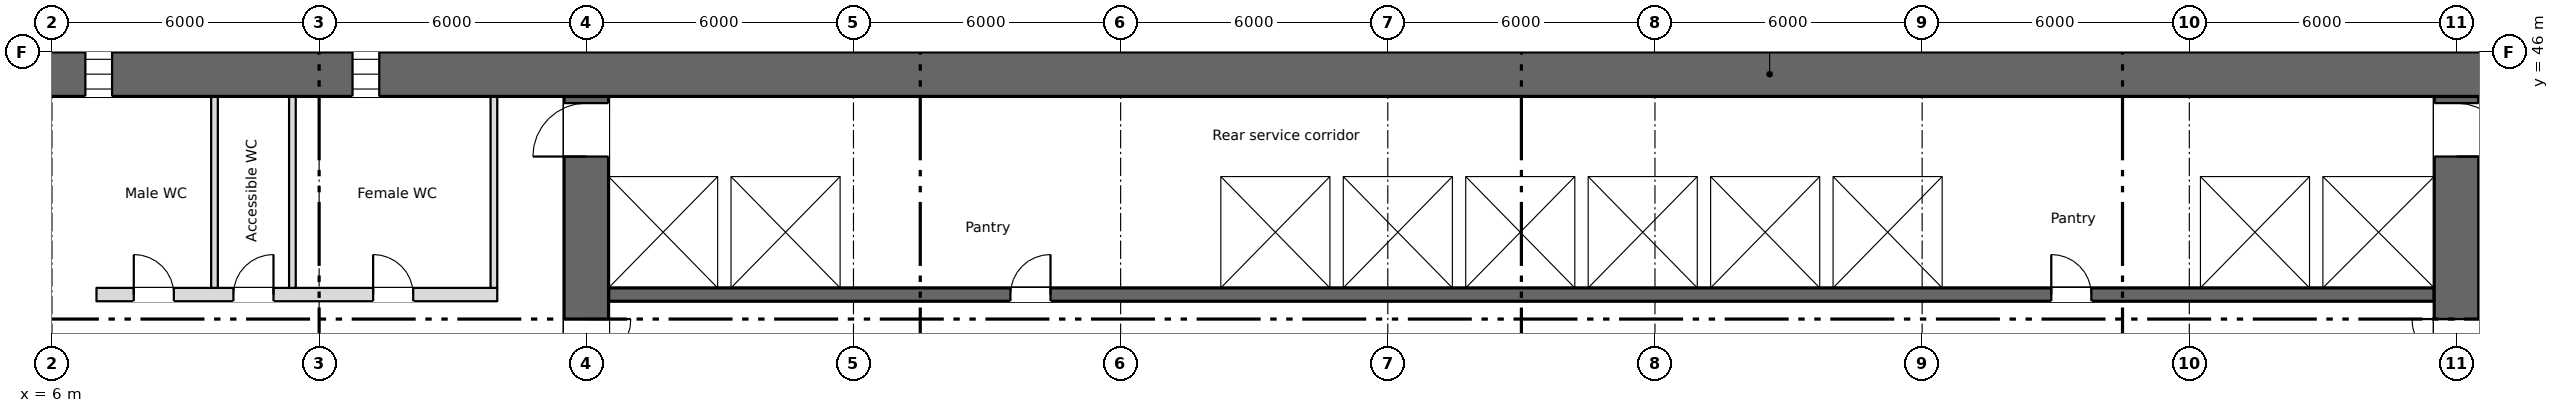
"""IFC4 building model, lengths in metres.
Left out: names, types, materials, properties, quantities, classifications, styles, units other than length and angle.
Written with IfcOpenShell. Run it as: python <this file> out.ifc"""

import sys

from ifc_helpers import new_model, si_unit, direction, frame, frame_2d, origin, place, context, subcontext, project, spatial, rectangle, extrude, element, fill, save


model = new_model("IFC4")
c1 = context("Model", 3, precision=1e-05, world=origin(), true_north=direction((0.0, 1.0)))
c2 = subcontext(c1, "Body", "Model", "MODEL_VIEW")
j1 = project(units=[si_unit("LENGTHUNIT", "METRE"), si_unit("PLANEANGLEUNIT", "RADIAN")], contexts=[c1])
p1 = place(None, origin())
s1 = spatial("IfcSite", under=j1, at=p1, CompositionType="ELEMENT")
p2 = place(p1, origin())
s2 = spatial("IfcBuilding", under=s1, at=p2, CompositionType="ELEMENT")
p3 = place(p2, frame((0.0, 0.0, 41.25)))
s3 = spatial("IfcBuildingStorey", under=s2, at=p3, CompositionType="ELEMENT", Elevation=41.25)
p4 = place(p3, frame((5.55, 45.5, 0.0), z_axis=(0.0, 0.0, 1.0), x_axis=(1.0, 0.0, 0.0)))
e1 = element("IfcWall", 1, at=p4, inside=s3, PredefinedType="SHEAR", context=c2, shape_type="SweptSolid", body=[
    extrude(rectangle(XDim=66.9, YDim=1.0, at=frame_2d((33.45, 0.0))), origin(), (0.0, 0.0, 1.0), 3.35),
])
p5 = place(p4, frame((1.2, 0.0, 0.6)))
e2 = element("IfcOpeningElement", 2, at=p5, cuts=e1, PredefinedType="OPENING", context=c2, shape_type="SweptSolid", body=[
    extrude(rectangle(XDim=0.6, YDim=2.4, at=frame_2d((0.3, 1.2))), frame((0.0, 0.51, 0.0), z_axis=(0.0, -1.0, 0.0), x_axis=(1.0, 0.0, 0.0)), (0.0, 0.0, 1.0), 1.02),
])
p6 = place(p4, frame((7.2, 0.0, 0.6)))
e3 = element("IfcOpeningElement", 3, at=p6, cuts=e1, PredefinedType="OPENING", context=c2, shape_type="SweptSolid", body=[
    extrude(rectangle(XDim=0.6, YDim=2.4, at=frame_2d((0.3, 1.2))), frame((0.0, 0.51, 0.0), z_axis=(0.0, -1.0, 0.0), x_axis=(1.0, 0.0, 0.0)), (0.0, 0.0, 1.0), 1.02),
])
p7 = place(p4, frame((55.2, 0.0, 0.6)))
e4 = element("IfcOpeningElement", 4, at=p7, cuts=e1, PredefinedType="OPENING", context=c2, shape_type="SweptSolid", body=[
    extrude(rectangle(XDim=0.6, YDim=2.4, at=frame_2d((0.3, 1.2))), frame((0.0, 0.51, 0.0), z_axis=(0.0, -1.0, 0.0), x_axis=(1.0, 0.0, 0.0)), (0.0, 0.0, 1.0), 1.02),
])
p8 = place(p4, frame((61.2, 0.0, 0.6)))
e5 = element("IfcOpeningElement", 5, at=p8, cuts=e1, PredefinedType="OPENING", context=c2, shape_type="SweptSolid", body=[
    extrude(rectangle(XDim=0.6, YDim=2.4, at=frame_2d((0.3, 1.2))), frame((0.0, 0.51, 0.0), z_axis=(0.0, -1.0, 0.0), x_axis=(1.0, 0.0, 0.0)), (0.0, 0.0, 1.0), 1.02),
])
p9 = place(p3, frame((6.85, 28.4, 0.0), z_axis=(0.0, 0.0, 1.0), x_axis=(0.0, 1.0, 0.0)))
e6 = element("IfcWall", 6, at=p9, inside=s3, PredefinedType="SHEAR", context=c2, shape_type="SweptSolid", body=[
    extrude(rectangle(XDim=16.6, YDim=0.3, at=frame_2d((8.3, 0.0))), origin(), (0.0, 0.0, 1.0), 3.35),
])
p10 = place(p3, frame((18.0, 28.4, 0.0), z_axis=(0.0, 0.0, 1.0), x_axis=(0.0, 1.0, 0.0)))
e7 = element("IfcWall", 7, at=p10, inside=s3, PredefinedType="SHEAR", context=c2, shape_type="SweptSolid", body=[
    extrude(rectangle(XDim=16.6, YDim=1.0, at=frame_2d((8.3, 0.0))), origin(), (0.0, 0.0, 1.0), 3.35),
])
p11 = place(p10, frame((9.6, 0.0, 0.0)))
e8 = element("IfcOpeningElement", 8, at=p11, cuts=e7, PredefinedType="OPENING", context=c2, shape_type="SweptSolid", body=[
    extrude(rectangle(XDim=2.0, YDim=2.1, at=frame_2d((1.0, 1.05))), frame((0.0, 0.51, 0.0), z_axis=(0.0, -1.0, 0.0), x_axis=(1.0, 0.0, 0.0)), (0.0, 0.0, 1.0), 1.02),
])
p12 = place(p10, frame((15.25, 0.0, 0.0)))
e9 = element("IfcOpeningElement", 9, at=p12, cuts=e7, PredefinedType="OPENING", context=c2, shape_type="SweptSolid", body=[
    extrude(rectangle(XDim=1.2, YDim=2.1, at=frame_2d((0.6, 1.05))), frame((0.0, 0.51, 0.0), z_axis=(0.0, -1.0, 0.0), x_axis=(1.0, 0.0, 0.0)), (0.0, 0.0, 1.0), 1.02),
])
p13 = place(p3, frame((60.0, 28.4, 0.0), z_axis=(0.0, 0.0, 1.0), x_axis=(0.0, 1.0, 0.0)))
e10 = element("IfcWall", 10, at=p13, inside=s3, PredefinedType="SHEAR", context=c2, shape_type="SweptSolid", body=[
    extrude(rectangle(XDim=16.6, YDim=1.0, at=frame_2d((8.3, 0.0))), origin(), (0.0, 0.0, 1.0), 3.35),
])
p14 = place(p13, frame((9.6, 0.0, 0.0)))
e11 = element("IfcOpeningElement", 11, at=p14, cuts=e10, PredefinedType="OPENING", context=c2, shape_type="SweptSolid", body=[
    extrude(rectangle(XDim=2.0, YDim=2.1, at=frame_2d((1.0, 1.05))), frame((0.0, 0.51, 0.0), z_axis=(0.0, -1.0, 0.0), x_axis=(1.0, 0.0, 0.0)), (0.0, 0.0, 1.0), 1.02),
])
p15 = place(p13, frame((15.25, 0.0, 0.0)))
e12 = element("IfcOpeningElement", 12, at=p15, cuts=e10, PredefinedType="OPENING", context=c2, shape_type="SweptSolid", body=[
    extrude(rectangle(XDim=1.2, YDim=2.1, at=frame_2d((0.6, 1.05))), frame((0.0, 0.51, 0.0), z_axis=(0.0, -1.0, 0.0), x_axis=(1.0, 0.0, 0.0)), (0.0, 0.0, 1.0), 1.02),
])
p16 = place(p3, frame((18.5, 40.55, 0.0), z_axis=(0.0, 0.0, 1.0), x_axis=(1.0, 0.0, 0.0)))
e13 = element("IfcWall", 13, at=p16, inside=s3, PredefinedType="SHEAR", context=c2, shape_type="SweptSolid", body=[
    extrude(rectangle(XDim=41.0, YDim=0.3, at=frame_2d((20.5, 0.0))), origin(), (0.0, 0.0, 1.0), 3.35),
])
p17 = place(p16, frame((9.025, 0.0, 0.0)))
e14 = element("IfcOpeningElement", 14, at=p17, cuts=e13, PredefinedType="OPENING", context=c2, shape_type="SweptSolid", body=[
    extrude(rectangle(XDim=0.9, YDim=2.1, at=frame_2d((0.45, 1.05))), frame((0.0, 0.16, 0.0), z_axis=(0.0, -1.0, 0.0), x_axis=(1.0, 0.0, 0.0)), (0.0, 0.0, 1.0), 0.32),
])
p18 = place(p16, frame((32.4, 0.0, 0.0)))
e15 = element("IfcOpeningElement", 15, at=p18, cuts=e13, PredefinedType="OPENING", context=c2, shape_type="SweptSolid", body=[
    extrude(rectangle(XDim=0.9, YDim=2.1, at=frame_2d((0.45, 1.05))), frame((0.0, 0.16, 0.0), z_axis=(0.0, -1.0, 0.0), x_axis=(1.0, 0.0, 0.0)), (0.0, 0.0, 1.0), 0.32),
])
p19 = place(p16, frame((14.425, 0.0, 0.0)))
e16 = element("IfcOpeningElement", 16, at=p19, cuts=e13, PredefinedType="OPENING", context=c2, shape_type="SweptSolid", body=[
    extrude(rectangle(XDim=1.1, YDim=2.1, at=frame_2d((0.55, 1.05))), frame((0.0, 0.16, 0.0), z_axis=(0.0, -1.0, 0.0), x_axis=(1.0, 0.0, 0.0)), (0.0, 0.0, 1.0), 0.32),
])
p20 = place(p16, frame((17.175, 0.0, 0.0)))
e17 = element("IfcOpeningElement", 17, at=p20, cuts=e13, PredefinedType="OPENING", context=c2, shape_type="SweptSolid", body=[
    extrude(rectangle(XDim=1.1, YDim=2.1, at=frame_2d((0.55, 1.05))), frame((0.0, 0.16, 0.0), z_axis=(0.0, -1.0, 0.0), x_axis=(1.0, 0.0, 0.0)), (0.0, 0.0, 1.0), 0.32),
])
p21 = place(p16, frame((19.925, 0.0, 0.0)))
e18 = element("IfcOpeningElement", 18, at=p21, cuts=e13, PredefinedType="OPENING", context=c2, shape_type="SweptSolid", body=[
    extrude(rectangle(XDim=1.1, YDim=2.1, at=frame_2d((0.55, 1.05))), frame((0.0, 0.16, 0.0), z_axis=(0.0, -1.0, 0.0), x_axis=(1.0, 0.0, 0.0)), (0.0, 0.0, 1.0), 0.32),
])
p22 = place(p16, frame((22.675, 0.0, 0.0)))
e19 = element("IfcOpeningElement", 19, at=p22, cuts=e13, PredefinedType="OPENING", context=c2, shape_type="SweptSolid", body=[
    extrude(rectangle(XDim=1.1, YDim=2.1, at=frame_2d((0.55, 1.05))), frame((0.0, 0.16, 0.0), z_axis=(0.0, -1.0, 0.0), x_axis=(1.0, 0.0, 0.0)), (0.0, 0.0, 1.0), 0.32),
])
p23 = place(p16, frame((36.375, 0.0, 0.0)))
e20 = element("IfcOpeningElement", 20, at=p23, cuts=e13, PredefinedType="OPENING", context=c2, shape_type="SweptSolid", body=[
    extrude(rectangle(XDim=1.2, YDim=2.1, at=frame_2d((0.6, 1.05))), frame((0.0, 0.16, 0.0), z_axis=(0.0, -1.0, 0.0), x_axis=(1.0, 0.0, 0.0)), (0.0, 0.0, 1.0), 0.32),
])
p24 = place(p16, frame((39.15, 0.0, 0.0)))
e21 = element("IfcOpeningElement", 21, at=p24, cuts=e13, PredefinedType="OPENING", context=c2, shape_type="SweptSolid", body=[
    extrude(rectangle(XDim=1.2, YDim=2.1, at=frame_2d((0.6, 1.05))), frame((0.0, 0.16, 0.0), z_axis=(0.0, -1.0, 0.0), x_axis=(1.0, 0.0, 0.0)), (0.0, 0.0, 1.0), 0.32),
])
p25 = place(p3, frame((18.5, 43.35, 0.0), z_axis=(0.0, 0.0, 1.0), x_axis=(1.0, 0.0, 0.0)))
e22 = element("IfcWall", 22, at=p25, inside=s3, PredefinedType="SHEAR", context=c2, shape_type="SweptSolid", body=[
    extrude(rectangle(XDim=41.0, YDim=0.3, at=frame_2d((20.5, 0.0))), origin(), (0.0, 0.0, 1.0), 3.35),
])
p26 = place(p3, frame((7.0, 40.55, 0.0), z_axis=(0.0, 0.0, 1.0), x_axis=(1.0, 0.0, 0.0)))
e23 = element("IfcWall", 23, at=p26, inside=s3, PredefinedType="PARTITIONING", context=c2, shape_type="SweptSolid", body=[
    extrude(rectangle(XDim=9.0, YDim=0.3, at=frame_2d((4.5, 0.0))), origin(), (0.0, 0.0, 1.0), 3.35),
])
p27 = place(p26, frame((0.837, 0.0, 0.0)))
e24 = element("IfcOpeningElement", 24, at=p27, cuts=e23, PredefinedType="OPENING", context=c2, shape_type="SweptSolid", body=[
    extrude(rectangle(XDim=0.9, YDim=2.1, at=frame_2d((0.45, 1.05))), frame((0.0, 0.16, 0.0), z_axis=(0.0, -1.0, 0.0), x_axis=(1.0, 0.0, 0.0)), (0.0, 0.0, 1.0), 0.32),
])
p28 = place(p26, frame((3.075, 0.0, 0.0)))
e25 = element("IfcOpeningElement", 25, at=p28, cuts=e23, PredefinedType="OPENING", context=c2, shape_type="SweptSolid", body=[
    extrude(rectangle(XDim=0.9, YDim=2.1, at=frame_2d((0.45, 1.05))), frame((0.0, 0.16, 0.0), z_axis=(0.0, -1.0, 0.0), x_axis=(1.0, 0.0, 0.0)), (0.0, 0.0, 1.0), 0.32),
])
p29 = place(p26, frame((6.212, 0.0, 0.0)))
e26 = element("IfcOpeningElement", 26, at=p29, cuts=e23, PredefinedType="OPENING", context=c2, shape_type="SweptSolid", body=[
    extrude(rectangle(XDim=0.9, YDim=2.1, at=frame_2d((0.45, 1.05))), frame((0.0, 0.16, 0.0), z_axis=(0.0, -1.0, 0.0), x_axis=(1.0, 0.0, 0.0)), (0.0, 0.0, 1.0), 0.32),
])
for number, where, z_axis, x_axis in (
    (27, (21.1, 40.7, 0.0), (0.0, 0.0, 1.0), (0.0, 1.0, 0.0)),
    (28, (23.85, 40.7, 0.0), (0.0, 0.0, 1.0), (0.0, 1.0, 0.0)),
    (29, (32.1, 40.7, 0.0), (0.0, 0.0, 1.0), (0.0, 1.0, 0.0)),
    (30, (34.85, 40.7, 0.0), (0.0, 0.0, 1.0), (0.0, 1.0, 0.0)),
    (31, (37.6, 40.7, 0.0), (0.0, 0.0, 1.0), (0.0, 1.0, 0.0)),
    (32, (40.35, 40.7, 0.0), (0.0, 0.0, 1.0), (0.0, 1.0, 0.0)),
    (33, (43.1, 40.7, 0.0), (0.0, 0.0, 1.0), (0.0, 1.0, 0.0)),
    (34, (45.85, 40.7, 0.0), (0.0, 0.0, 1.0), (0.0, 1.0, 0.0)),
    (35, (48.6, 40.7, 0.0), (0.0, 0.0, 1.0), (0.0, 1.0, 0.0)),
    (36, (54.1, 40.7, 0.0), (0.0, 0.0, 1.0), (0.0, 1.0, 0.0)),
    (37, (56.85, 40.7, 0.0), (0.0, 0.0, 1.0), (0.0, 1.0, 0.0)),
):
    element("IfcWall", number, at=place(p3, frame(where, z_axis=z_axis, x_axis=x_axis)), inside=s3, PredefinedType="SHEAR", context=c2, shape_type="SweptSolid", body=[
        extrude(rectangle(XDim=2.5, YDim=0.3, at=frame_2d((1.25, 0.0))), origin(), (0.0, 0.0, 1.0), 3.35),
    ])
for number, where, z_axis, x_axis in (
    (38, (15.925, 40.7, 0.0), (0.0, 0.0, 1.0), (0.0, 1.0, 0.0)),
    (39, (9.65, 40.7, 0.0), (0.0, 0.0, 1.0), (0.0, 1.0, 0.0)),
    (40, (11.4, 40.7, 0.0), (0.0, 0.0, 1.0), (0.0, 1.0, 0.0)),
):
    element("IfcWall", number, at=place(p3, frame(where, z_axis=z_axis, x_axis=x_axis)), inside=s3, PredefinedType="PARTITIONING", context=c2, shape_type="SweptSolid", body=[
        extrude(rectangle(XDim=4.3, YDim=0.15, at=frame_2d((2.15, 0.0))), origin(), (0.0, 0.0, 1.0), 3.35),
    ])
p30 = place(p5, origin())
e41 = element("IfcWindow", 41, at=p30, inside=s3, PartitioningType="SINGLE_PANEL", PredefinedType="WINDOW", context=c2, shape_type="SweptSolid", body=[
    extrude(rectangle(XDim=0.6, YDim=2.4, at=frame_2d((0.3, 1.2))), frame((0.0, 0.03, 0.0), z_axis=(0.0, -1.0, 0.0), x_axis=(1.0, 0.0, 0.0)), (0.0, 0.0, 1.0), 0.06),
])
fill(e2, e41)
p31 = place(p6, origin())
e42 = element("IfcWindow", 42, at=p31, inside=s3, PartitioningType="SINGLE_PANEL", PredefinedType="WINDOW", context=c2, shape_type="SweptSolid", body=[
    extrude(rectangle(XDim=0.6, YDim=2.4, at=frame_2d((0.3, 1.2))), frame((0.0, 0.03, 0.0), z_axis=(0.0, -1.0, 0.0), x_axis=(1.0, 0.0, 0.0)), (0.0, 0.0, 1.0), 0.06),
])
fill(e3, e42)
p32 = place(p27, origin())
e43 = element("IfcDoor", 43, at=p32, inside=s3, OperationType="SINGLE_SWING_LEFT", PredefinedType="DOOR", context=c2, shape_type="SweptSolid", body=[
    extrude(rectangle(XDim=0.9, YDim=2.1, at=frame_2d((0.45, 1.05))), frame((0.0, 0.025, 0.0), z_axis=(0.0, -1.0, 0.0), x_axis=(1.0, 0.0, 0.0)), (0.0, 0.0, 1.0), 0.05),
])
fill(e24, e43)
p33 = place(p28, origin())
e44 = element("IfcDoor", 44, at=p33, inside=s3, OperationType="SINGLE_SWING_RIGHT", PredefinedType="DOOR", context=c2, shape_type="SweptSolid", body=[
    extrude(rectangle(XDim=0.9, YDim=2.1, at=frame_2d((0.45, 1.05))), frame((0.0, 0.025, 0.0), z_axis=(0.0, -1.0, 0.0), x_axis=(1.0, 0.0, 0.0)), (0.0, 0.0, 1.0), 0.05),
])
fill(e25, e44)
p34 = place(p29, origin())
e45 = element("IfcDoor", 45, at=p34, inside=s3, OperationType="SINGLE_SWING_LEFT", PredefinedType="DOOR", context=c2, shape_type="SweptSolid", body=[
    extrude(rectangle(XDim=0.9, YDim=2.1, at=frame_2d((0.45, 1.05))), frame((0.0, 0.025, 0.0), z_axis=(0.0, -1.0, 0.0), x_axis=(1.0, 0.0, 0.0)), (0.0, 0.0, 1.0), 0.05),
])
fill(e26, e45)
p35 = place(p17, origin())
e46 = element("IfcDoor", 46, at=p35, inside=s3, OperationType="SINGLE_SWING_RIGHT", PredefinedType="DOOR", context=c2, shape_type="SweptSolid", body=[
    extrude(rectangle(XDim=0.9, YDim=2.1, at=frame_2d((0.45, 1.05))), frame((0.0, 0.025, 0.0), z_axis=(0.0, -1.0, 0.0), x_axis=(1.0, 0.0, 0.0)), (0.0, 0.0, 1.0), 0.05),
])
fill(e14, e46)
p36 = place(p18, origin())
e47 = element("IfcDoor", 47, at=p36, inside=s3, OperationType="SINGLE_SWING_LEFT", PredefinedType="DOOR", context=c2, shape_type="SweptSolid", body=[
    extrude(rectangle(XDim=0.9, YDim=2.1, at=frame_2d((0.45, 1.05))), frame((0.0, 0.025, 0.0), z_axis=(0.0, -1.0, 0.0), x_axis=(1.0, 0.0, 0.0)), (0.0, 0.0, 1.0), 0.05),
])
fill(e15, e47)
p37 = place(p19, origin())
e48 = element("IfcDoor", 48, at=p37, inside=s3, OperationType="SLIDING_TO_LEFT", PredefinedType="DOOR", context=c2, shape_type="SweptSolid", body=[
    extrude(rectangle(XDim=1.1, YDim=2.1, at=frame_2d((0.55, 1.05))), frame((0.0, 0.025, 0.0), z_axis=(0.0, -1.0, 0.0), x_axis=(1.0, 0.0, 0.0)), (0.0, 0.0, 1.0), 0.05),
])
fill(e16, e48)
p38 = place(p20, origin())
e49 = element("IfcDoor", 49, at=p38, inside=s3, OperationType="SLIDING_TO_LEFT", PredefinedType="DOOR", context=c2, shape_type="SweptSolid", body=[
    extrude(rectangle(XDim=1.1, YDim=2.1, at=frame_2d((0.55, 1.05))), frame((0.0, 0.025, 0.0), z_axis=(0.0, -1.0, 0.0), x_axis=(1.0, 0.0, 0.0)), (0.0, 0.0, 1.0), 0.05),
])
fill(e17, e49)
p39 = place(p21, origin())
e50 = element("IfcDoor", 50, at=p39, inside=s3, OperationType="SLIDING_TO_LEFT", PredefinedType="DOOR", context=c2, shape_type="SweptSolid", body=[
    extrude(rectangle(XDim=1.1, YDim=2.1, at=frame_2d((0.55, 1.05))), frame((0.0, 0.025, 0.0), z_axis=(0.0, -1.0, 0.0), x_axis=(1.0, 0.0, 0.0)), (0.0, 0.0, 1.0), 0.05),
])
fill(e18, e50)
p40 = place(p22, origin())
e51 = element("IfcDoor", 51, at=p40, inside=s3, OperationType="SLIDING_TO_LEFT", PredefinedType="DOOR", context=c2, shape_type="SweptSolid", body=[
    extrude(rectangle(XDim=1.1, YDim=2.1, at=frame_2d((0.55, 1.05))), frame((0.0, 0.025, 0.0), z_axis=(0.0, -1.0, 0.0), x_axis=(1.0, 0.0, 0.0)), (0.0, 0.0, 1.0), 0.05),
])
fill(e19, e51)
p41 = place(p23, origin())
e52 = element("IfcDoor", 52, at=p41, inside=s3, OperationType="SLIDING_TO_LEFT", PredefinedType="DOOR", context=c2, shape_type="SweptSolid", body=[
    extrude(rectangle(XDim=1.2, YDim=2.1, at=frame_2d((0.6, 1.05))), frame((0.0, 0.025, 0.0), z_axis=(0.0, -1.0, 0.0), x_axis=(1.0, 0.0, 0.0)), (0.0, 0.0, 1.0), 0.05),
])
fill(e20, e52)
p42 = place(p24, origin())
e53 = element("IfcDoor", 53, at=p42, inside=s3, OperationType="SLIDING_TO_LEFT", PredefinedType="DOOR", context=c2, shape_type="SweptSolid", body=[
    extrude(rectangle(XDim=1.2, YDim=2.1, at=frame_2d((0.6, 1.05))), frame((0.0, 0.025, 0.0), z_axis=(0.0, -1.0, 0.0), x_axis=(1.0, 0.0, 0.0)), (0.0, 0.0, 1.0), 0.05),
])
fill(e21, e53)
p43 = place(p11, origin())
e54 = element("IfcDoor", 54, at=p43, inside=s3, OperationType="DOUBLE_DOOR_SINGLE_SWING", PredefinedType="DOOR", context=c2, shape_type="SweptSolid", body=[
    extrude(rectangle(XDim=2.0, YDim=2.1, at=frame_2d((1.0, 1.05))), frame((0.0, 0.025, 0.0), z_axis=(0.0, -1.0, 0.0), x_axis=(1.0, 0.0, 0.0)), (0.0, 0.0, 1.0), 0.05),
])
fill(e8, e54)
p44 = place(p14, origin())
e55 = element("IfcDoor", 55, at=p44, inside=s3, OperationType="DOUBLE_DOOR_SINGLE_SWING", PredefinedType="DOOR", context=c2, shape_type="SweptSolid", body=[
    extrude(rectangle(XDim=2.0, YDim=2.1, at=frame_2d((1.0, 1.05))), frame((0.0, 0.025, 0.0), z_axis=(0.0, -1.0, 0.0), x_axis=(1.0, 0.0, 0.0)), (0.0, 0.0, 1.0), 0.05),
])
fill(e11, e55)
p45 = place(p12, origin())
e56 = element("IfcDoor", 56, at=p45, inside=s3, OperationType="SINGLE_SWING_LEFT", PredefinedType="DOOR", context=c2, shape_type="SweptSolid", body=[
    extrude(rectangle(XDim=1.2, YDim=2.1, at=frame_2d((0.6, 1.05))), frame((0.0, 0.025, 0.0), z_axis=(0.0, -1.0, 0.0), x_axis=(1.0, 0.0, 0.0)), (0.0, 0.0, 1.0), 0.05),
])
fill(e9, e56)
p46 = place(p15, origin())
e57 = element("IfcDoor", 57, at=p46, inside=s3, OperationType="SINGLE_SWING_LEFT", PredefinedType="DOOR", context=c2, shape_type="SweptSolid", body=[
    extrude(rectangle(XDim=1.2, YDim=2.1, at=frame_2d((0.6, 1.05))), frame((0.0, 0.025, 0.0), z_axis=(0.0, -1.0, 0.0), x_axis=(1.0, 0.0, 0.0)), (0.0, 0.0, 1.0), 0.05),
])
fill(e12, e57)
save(model, sys.argv[1])
